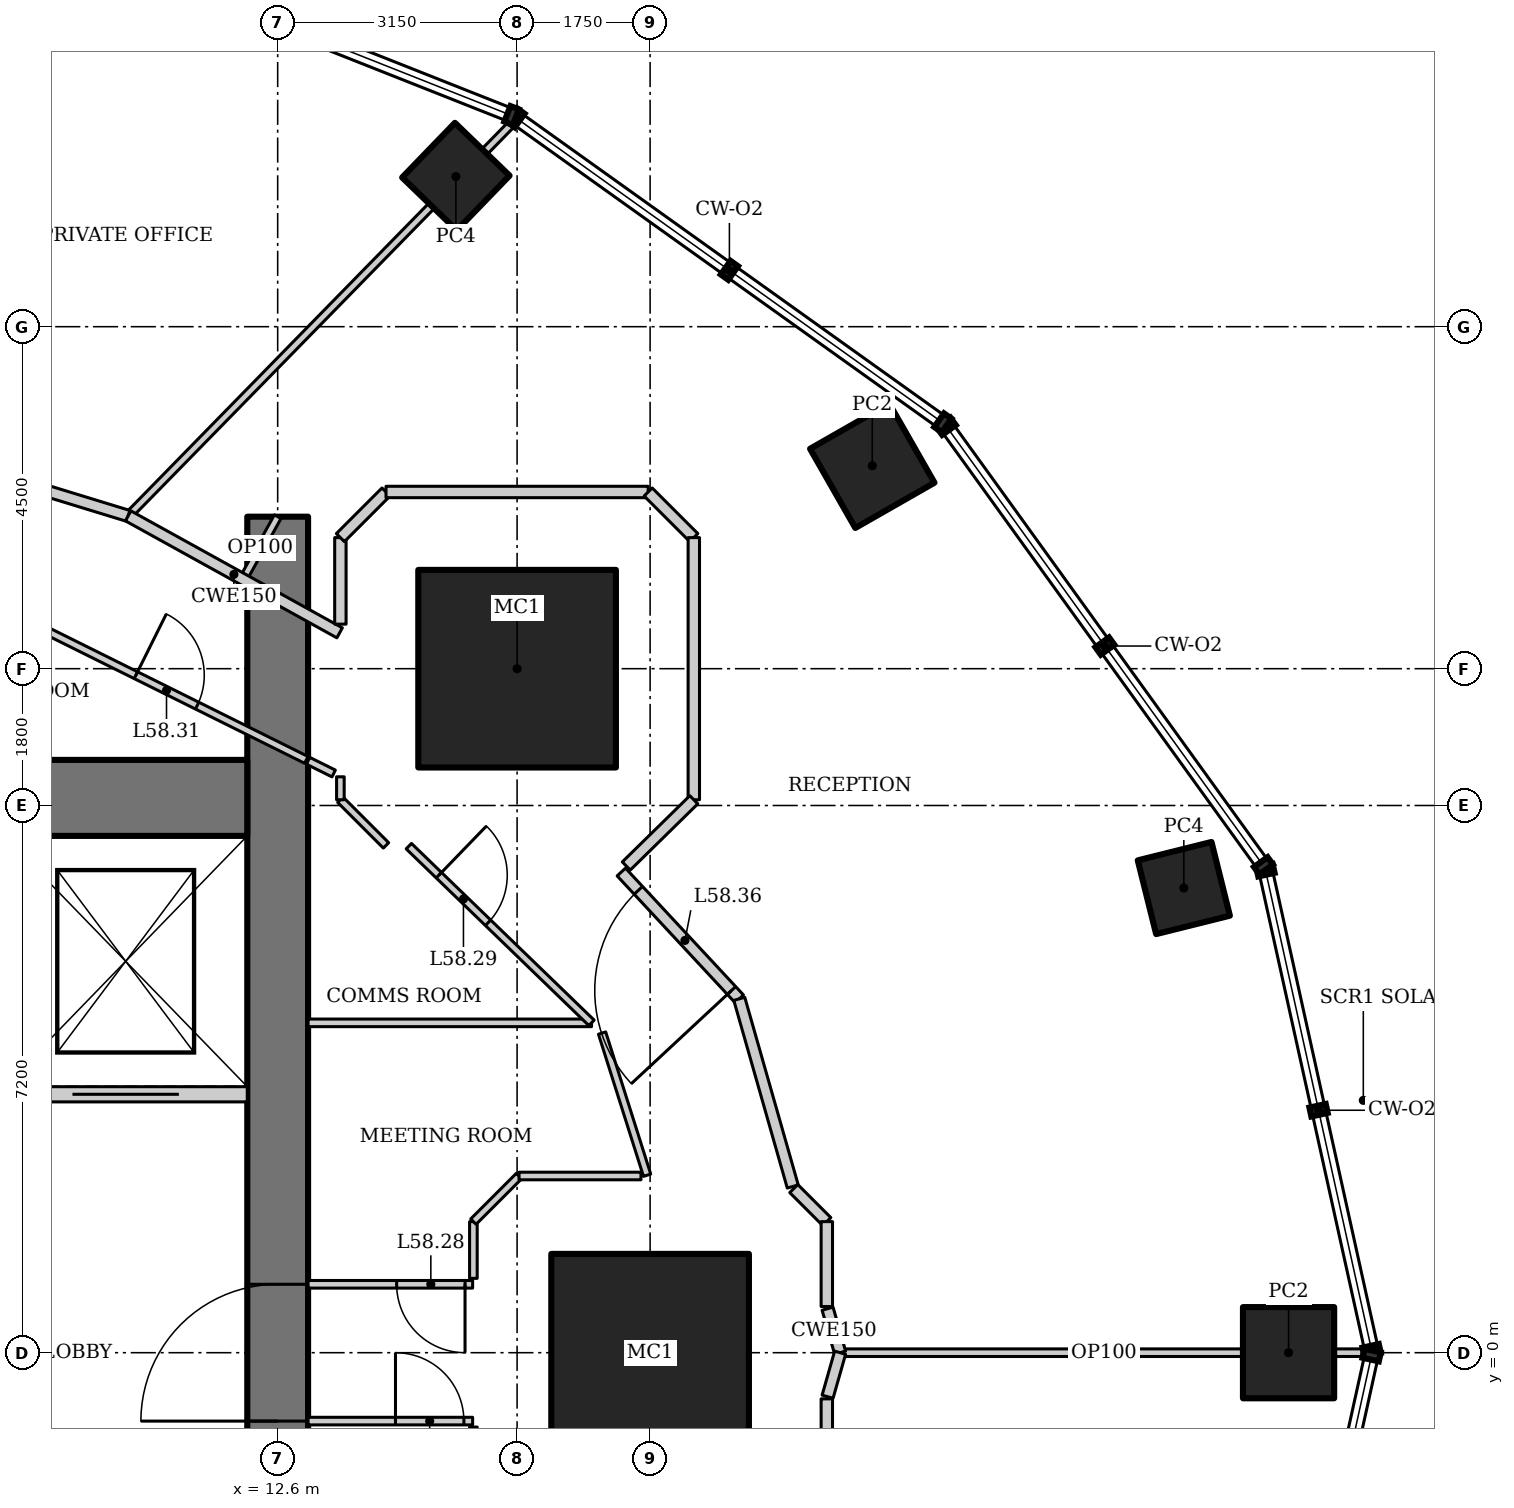
"""IFC4 building model, lengths in metres.
Left out: names, types, materials, properties, quantities, classifications, styles, units other than length and angle.
Written with IfcOpenShell. Run it as: python <this file> out.ifc"""

import sys

from ifc_helpers import new_model, si_unit, direction, frame, frame_2d, origin, origin_2d, place, context, subcontext, project, spatial, rectangle, hollow_rectangle, extrude, element, fill, save


model = new_model("IFC4")
c1 = context("Model", 3, precision=1e-05, world=origin(), true_north=direction((0.0, 1.0)))
c2 = subcontext(c1, "Body", "Model", "MODEL_VIEW")
j1 = project(units=[si_unit("LENGTHUNIT", "METRE"), si_unit("PLANEANGLEUNIT", "RADIAN")], contexts=[c1])
p1 = place(None, origin())
s1 = spatial("IfcSite", under=j1, at=p1, CompositionType="ELEMENT")
p2 = place(p1, origin())
s2 = spatial("IfcBuilding", under=s1, at=p2, CompositionType="ELEMENT")
p3 = place(p2, frame((0.0, 0.0, 249.4)))
s3 = spatial("IfcBuildingStorey", under=s2, at=p3, CompositionType="ELEMENT", Elevation=249.4)
for number, where, z_axis, x_axis in (
    (1, (17.5, 0.0, 0.0), (0.0, 0.0, 1.0), (1.0, 0.0, 0.0)),
    (2, (15.75, 9.0, 0.0), (0.0, 0.0, 1.0), (1.0, 0.0, 0.0)),
):
    element("IfcColumn", number, at=place(p3, frame(where, z_axis=z_axis, x_axis=x_axis)), inside=s3, PredefinedType="COLUMN", context=c2, shape_type="SweptSolid", body=[
        extrude(hollow_rectangle(XDim=2.6, YDim=2.6, WallThickness=0.13, at=origin_2d()), origin(), (0.0, 0.0, 1.0), 4.2),
    ])
p4 = place(p3, frame((25.9, 0.0, 0.0), z_axis=(0.0, 0.0, 1.0), x_axis=(1.0, 0.0, 0.0)))
e3 = element("IfcColumn", 3, at=p4, inside=s3, PredefinedType="COLUMN", context=c2, shape_type="SweptSolid", body=[
    extrude(hollow_rectangle(XDim=1.2, YDim=1.2, WallThickness=0.1, at=origin_2d()), origin(), (0.0, 0.0, 1.0), 4.2),
])
p5 = place(p3, frame((24.522, 6.114, 0.0), z_axis=(0.0, 0.0, 1.0), x_axis=(0.970295726276, 0.2419218956, 0.0)))
e4 = element("IfcColumn", 4, at=p5, inside=s3, PredefinedType="COLUMN", context=c2, shape_type="SweptSolid", body=[
    extrude(hollow_rectangle(XDim=1.0, YDim=1.0, WallThickness=0.08, at=origin_2d()), origin(), (0.0, 0.0, 1.0), 4.2),
])
p6 = place(p3, frame((20.423, 11.67, 0.0), z_axis=(0.0, 0.0, 1.0), x_axis=(0.86824298017, 0.496139221777, 0.0)))
e5 = element("IfcColumn", 5, at=p6, inside=s3, PredefinedType="COLUMN", context=c2, shape_type="SweptSolid", body=[
    extrude(hollow_rectangle(XDim=1.2, YDim=1.2, WallThickness=0.1, at=origin_2d()), origin(), (0.0, 0.0, 1.0), 4.2),
])
for number, where, z_axis, x_axis in (
    (6, (14.944, 15.475, 0.0), (0.0, 0.0, 1.0), (0.695, 0.719, 0.0)),
    (7, (9.035, 17.731, 0.0), (0.0, 0.0, 1.0), (0.454, 0.891, 0.0)),
):
    element("IfcColumn", number, at=place(p3, frame(where, z_axis=z_axis, x_axis=x_axis)), inside=s3, PredefinedType="COLUMN", context=c2, shape_type="SweptSolid", body=[
        extrude(hollow_rectangle(XDim=1.0, YDim=1.0, WallThickness=0.08, at=origin_2d()), origin(), (0.0, 0.0, 1.0), 4.2),
    ])
p7 = place(p3, frame((12.6, -11.0, 0.0), z_axis=(0.0, 0.0, 1.0), x_axis=(0.0, 1.0, 0.0)))
e8 = element("IfcWall", 8, at=p7, inside=s3, PredefinedType="SHEAR", context=c2, shape_type="SweptSolid", body=[
    extrude(rectangle(XDim=22.0, YDim=0.8, at=frame_2d((11.0, 0.0))), origin(), (0.0, 0.0, 1.0), 4.2),
])
p8 = place(p7, frame((10.1, 0.0, 0.0)))
e9 = element("IfcOpeningElement", 9, at=p8, cuts=e8, PredefinedType="OPENING", context=c2, shape_type="SweptSolid", body=[
    extrude(rectangle(XDim=1.8, YDim=2.1, at=frame_2d((0.9, 1.05))), frame((0.0, 0.41, 0.0), z_axis=(0.0, -1.0, 0.0), x_axis=(1.0, 0.0, 0.0)), (0.0, 0.0, 1.0), 0.82),
])
p9 = place(p3, frame((12.2, 7.3, 0.0), z_axis=(0.0, 0.0, 1.0), x_axis=(-1.0, 0.0, 0.0)))
e10 = element("IfcWall", 10, at=p9, inside=s3, PredefinedType="SHEAR", context=c2, shape_type="SweptSolid", body=[
    extrude(rectangle(XDim=6.6, YDim=1.0, at=frame_2d((3.3, 0.0))), origin(), (0.0, 0.0, 1.0), 4.2),
])
p10 = place(p3, frame((12.2, 3.4, 0.0), z_axis=(0.0, 0.0, 1.0), x_axis=(-1.0, 0.0, 0.0)))
e11 = element("IfcWall", 11, at=p10, inside=s3, PredefinedType="SOLIDWALL", context=c2, shape_type="SweptSolid", body=[
    extrude(rectangle(XDim=6.6, YDim=0.2, at=frame_2d((3.3, 0.0))), origin(), (0.0, 0.0, 1.0), 4.2),
])
p11 = place(p10, frame((4.45, 0.0, 0.0)))
e12 = element("IfcOpeningElement", 12, at=p11, cuts=e11, PredefinedType="OPENING", context=c2, shape_type="SweptSolid", body=[
    extrude(rectangle(XDim=1.1, YDim=2.2, at=frame_2d((0.55, 1.1))), frame((0.0, 0.11, 0.0), z_axis=(0.0, -1.0, 0.0), x_axis=(1.0, 0.0, 0.0)), (0.0, 0.0, 1.0), 0.22),
])
p12 = place(p10, frame((0.9, 0.0, 0.0)))
e13 = element("IfcOpeningElement", 13, at=p12, cuts=e11, PredefinedType="OPENING", context=c2, shape_type="SweptSolid", body=[
    extrude(rectangle(XDim=1.4, YDim=2.2, at=frame_2d((0.7, 1.1))), frame((0.0, 0.11, 0.0), z_axis=(0.0, -1.0, 0.0), x_axis=(1.0, 0.0, 0.0)), (0.0, 0.0, 1.0), 0.22),
])
p13 = place(p3, frame((26.944, 0.0, 0.0), z_axis=(0.0, 0.0, 1.0), x_axis=(-1.0, 0.0, 0.0)))
e14 = element("IfcWall", 14, at=p13, inside=s3, PredefinedType="PARTITIONING", context=c2, shape_type="SweptSolid", body=[
    extrude(rectangle(XDim=6.944, YDim=0.1, at=frame_2d((3.472, 0.0))), origin(), (0.0, 0.0, 1.0), 3.349),
])
p14 = place(p3, frame((15.709, 16.199, 0.0), z_axis=(0.0, 0.0, 1.0), x_axis=(-0.699362525935, -0.714767135029, 0.0)))
e15 = element("IfcWall", 15, at=p14, inside=s3, PredefinedType="PARTITIONING", context=c2, shape_type="SweptSolid", body=[
    extrude(rectangle(XDim=7.259, YDim=0.1, at=frame_2d((3.629, 0.0))), origin(), (0.0, 0.0, 1.0), 3.41),
])
p15 = place(p3, frame((10.633, 11.01, 0.0), z_axis=(0.0, 0.0, 1.0), x_axis=(-0.956185837153, 0.292760388079, 0.0)))
e16 = element("IfcWall", 16, at=p15, inside=s3, PredefinedType="PARTITIONING", context=c2, shape_type="SweptSolid", body=[
    extrude(rectangle(XDim=4.544, YDim=0.15, at=frame_2d((2.272, 0.0))), origin(), (0.0, 0.0, 1.0), 4.05),
])
p16 = place(p15, frame((3.494, 0.0, 0.0)))
e17 = element("IfcOpeningElement", 17, at=p16, cuts=e16, PredefinedType="OPENING", context=c2, shape_type="SweptSolid", body=[
    extrude(rectangle(XDim=0.9, YDim=2.1, at=frame_2d((0.45, 1.05))), frame((0.0, 0.085, 0.0), z_axis=(0.0, -1.0, 0.0), x_axis=(1.0, 0.0, 0.0)), (0.0, 0.0, 1.0), 0.17),
])
p17 = place(p3, frame((13.0, 4.34, 0.0), z_axis=(0.0, 0.0, 1.0), x_axis=(1.0, 0.0, 0.0)))
e18 = element("IfcWall", 18, at=p17, inside=s3, PredefinedType="PARTITIONING", context=c2, shape_type="SweptSolid", body=[
    extrude(rectangle(XDim=3.729, YDim=0.1, at=frame_2d((1.865, 0.0))), origin(), (0.0, 0.0, 1.0), 4.05),
])
p18 = place(p3, frame((13.0, 7.788, 0.0), z_axis=(0.0, 0.0, 1.0), x_axis=(0.895721570004, -0.444615416995, 0.0)))
e19 = element("IfcWall", 19, at=p18, inside=s3, PredefinedType="PARTITIONING", context=c2, shape_type="SweptSolid", body=[
    extrude(rectangle(XDim=0.376, YDim=0.1, at=frame_2d((0.188, 0.0))), origin(), (0.0, 0.0, 1.0), 4.05),
])
p19 = place(p3, frame((9.298, 9.628, 0.0), z_axis=(0.0, 0.0, 1.0), x_axis=(0.895529831139, -0.445001484874, 0.0)))
e20 = element("IfcWall", 20, at=p19, inside=s3, PredefinedType="PARTITIONING", context=c2, shape_type="SweptSolid", body=[
    extrude(rectangle(XDim=4.108, YDim=0.1, at=frame_2d((2.054, 0.0))), origin(), (0.0, 0.0, 1.0), 4.05),
])
p20 = place(p19, frame((1.604, 0.0, 0.0)))
e21 = element("IfcOpeningElement", 21, at=p20, cuts=e20, PredefinedType="OPENING", context=c2, shape_type="SweptSolid", body=[
    extrude(rectangle(XDim=0.9, YDim=2.1, at=frame_2d((0.45, 1.05))), frame((0.0, 0.06, 0.0), z_axis=(0.0, -1.0, 0.0), x_axis=(1.0, 0.0, 0.0)), (0.0, 0.0, 1.0), 0.12),
])
p21 = place(p3, frame((12.6, 11.0, 0.0), z_axis=(0.0, 0.0, 1.0), x_axis=(-0.484103558985, -0.875010710893, 0.0)))
e22 = element("IfcWall", 22, at=p21, inside=s3, PredefinedType="PARTITIONING", context=c2, shape_type="SweptSolid", body=[
    extrude(rectangle(XDim=0.943, YDim=0.1, at=frame_2d((0.472, 0.0))), origin(), (0.0, 0.0, 1.0), 4.05),
])
p22 = place(p3, frame((18.673, 4.656, 0.0), z_axis=(0.0, 0.0, 1.0), x_axis=(-0.680985069419, 0.732297299755, 0.0)))
e23 = element("IfcWall", 23, at=p22, inside=s3, PredefinedType="PARTITIONING", context=c2, shape_type="SweptSolid", body=[
    extrude(rectangle(XDim=2.279, YDim=0.15, at=frame_2d((1.14, 0.0))), origin(), (0.0, 0.0, 1.0), 4.05),
])
p23 = place(p22, frame((0.15, 0.0, 0.0)))
e24 = element("IfcOpeningElement", 24, at=p23, cuts=e23, PredefinedType="OPENING", context=c2, shape_type="SweptSolid", body=[
    extrude(rectangle(XDim=1.8, YDim=2.1, at=frame_2d((0.9, 1.05))), frame((0.0, 0.085, 0.0), z_axis=(0.0, -1.0, 0.0), x_axis=(1.0, 0.0, 0.0)), (0.0, 0.0, 1.0), 0.17),
])
p24 = place(p3, frame((13.415, 9.472, 0.0), z_axis=(0.0, 0.0, 1.0), x_axis=(-0.875072100837, 0.483992580869, 0.0)))
e25 = element("IfcWall", 25, at=p24, inside=s3, PredefinedType="PARTITIONING", context=c2, shape_type="SweptSolid", body=[
    extrude(rectangle(XDim=3.179, YDim=0.15, at=frame_2d((1.59, 0.0))), origin(), (0.0, 0.0, 1.0), 4.05),
])
p25 = place(p3, frame((14.325, 6.665, 0.0), z_axis=(0.0, 0.0, 1.0), x_axis=(0.718798647558, -0.695218314107, 0.0)))
e26 = element("IfcWall", 26, at=p25, inside=s3, PredefinedType="PARTITIONING", context=c2, shape_type="SweptSolid", body=[
    extrude(rectangle(XDim=3.344, YDim=0.1, at=frame_2d((1.672, 0.0))), origin(), (0.0, 0.0, 1.0), 4.05),
])
p26 = place(p25, frame((0.55, 0.0, 0.0)))
e27 = element("IfcOpeningElement", 27, at=p26, cuts=e26, PredefinedType="OPENING", context=c2, shape_type="SweptSolid", body=[
    extrude(rectangle(XDim=0.9, YDim=2.1, at=frame_2d((0.45, 1.05))), frame((0.0, 0.06, 0.0), z_axis=(0.0, -1.0, 0.0), x_axis=(1.0, 0.0, 0.0)), (0.0, 0.0, 1.0), 0.12),
])
p27 = place(p3, frame((14.025, 6.675, 0.0), z_axis=(0.0, 0.0, 1.0), x_axis=(-0.707106781187, 0.707106781187, 0.0)))
e28 = element("IfcWall", 28, at=p27, inside=s3, PredefinedType="PARTITIONING", context=c2, shape_type="SweptSolid", body=[
    extrude(rectangle(XDim=0.849, YDim=0.1, at=frame_2d((0.425, 0.0))), origin(), (0.0, 0.0, 1.0), 4.05),
])
p28 = place(p3, frame((13.425, 7.275, 0.0), z_axis=(0.0, 0.0, 1.0), x_axis=(0.0, 1.0, 0.0)))
e29 = element("IfcWall", 29, at=p28, inside=s3, PredefinedType="PARTITIONING", context=c2, shape_type="SweptSolid", body=[
    extrude(rectangle(XDim=0.302, YDim=0.1, at=frame_2d((0.151, 0.0))), origin(), (0.0, 0.0, 1.0), 4.05),
])
p29 = place(p3, frame((13.425, 9.586, 0.0), z_axis=(0.0, 0.0, 1.0), x_axis=(0.0, 1.0, 0.0)))
e30 = element("IfcWall", 30, at=p29, inside=s3, PredefinedType="PARTITIONING", context=c2, shape_type="SweptSolid", body=[
    extrude(rectangle(XDim=1.138, YDim=0.15, at=frame_2d((0.569, 0.0))), origin(), (0.0, 0.0, 1.0), 4.05),
])
p30 = place(p3, frame((13.425, 10.725, 0.0), z_axis=(0.0, 0.0, 1.0), x_axis=(0.707106781187, 0.707106781187, 0.0)))
e31 = element("IfcWall", 31, at=p30, inside=s3, PredefinedType="PARTITIONING", context=c2, shape_type="SweptSolid", body=[
    extrude(rectangle(XDim=0.849, YDim=0.15, at=frame_2d((0.425, 0.0))), origin(), (0.0, 0.0, 1.0), 4.05),
])
p31 = place(p3, frame((14.025, 11.325, 0.0), z_axis=(0.0, 0.0, 1.0), x_axis=(1.0, 0.0, 0.0)))
e32 = element("IfcWall", 32, at=p31, inside=s3, PredefinedType="PARTITIONING", context=c2, shape_type="SweptSolid", body=[
    extrude(rectangle(XDim=3.449, YDim=0.15, at=frame_2d((1.725, 0.0))), origin(), (0.0, 0.0, 1.0), 4.05),
])
p32 = place(p3, frame((17.475, 11.325, 0.0), z_axis=(0.0, 0.0, 1.0), x_axis=(0.707106781187, -0.707106781187, 0.0)))
e33 = element("IfcWall", 33, at=p32, inside=s3, PredefinedType="PARTITIONING", context=c2, shape_type="SweptSolid", body=[
    extrude(rectangle(XDim=0.849, YDim=0.15, at=frame_2d((0.425, 0.0))), origin(), (0.0, 0.0, 1.0), 4.05),
])
p33 = place(p3, frame((18.075, 10.725, 0.0), z_axis=(0.0, 0.0, 1.0), x_axis=(0.0, -1.0, 0.0)))
e34 = element("IfcWall", 34, at=p33, inside=s3, PredefinedType="PARTITIONING", context=c2, shape_type="SweptSolid", body=[
    extrude(rectangle(XDim=3.449, YDim=0.15, at=frame_2d((1.725, 0.0))), origin(), (0.0, 0.0, 1.0), 3.601),
])
p34 = place(p3, frame((18.075, 7.275, 0.0), z_axis=(0.0, 0.0, 1.0), x_axis=(-0.713842064016, -0.700306723973, 0.0)))
e35 = element("IfcWall", 35, at=p34, inside=s3, PredefinedType="PARTITIONING", context=c2, shape_type="SweptSolid", body=[
    extrude(rectangle(XDim=1.245, YDim=0.15, at=frame_2d((0.622, 0.0))), origin(), (0.0, 0.0, 1.0), 4.05),
])
p35 = place(p3, frame((20.0, 0.0, 0.0), z_axis=(0.0, 0.0, 1.0), x_axis=(-0.27407847996, 0.961707329089, 0.0)))
e36 = element("IfcWall", 36, at=p35, inside=s3, PredefinedType="PARTITIONING", context=c2, shape_type="SweptSolid", body=[
    extrude(rectangle(XDim=0.602, YDim=0.15, at=frame_2d((0.301, 0.0))), origin(), (0.0, 0.0, 1.0), 4.05),
])
p36 = place(p3, frame((19.377, 2.187, 0.0), z_axis=(0.0, 0.0, 1.0), x_axis=(-0.274067949327, 0.961710330168, 0.0)))
e37 = element("IfcWall", 37, at=p36, inside=s3, PredefinedType="PARTITIONING", context=c2, shape_type="SweptSolid", body=[
    extrude(rectangle(XDim=2.567, YDim=0.15, at=frame_2d((1.284, 0.0))), origin(), (0.0, 0.0, 1.0), 4.05),
])
p37 = place(p3, frame((19.835, -0.579, 0.0), z_axis=(0.0, 0.0, 1.0), x_axis=(0.27407847996, 0.961707329089, 0.0)))
e38 = element("IfcWall", 38, at=p37, inside=s3, PredefinedType="PARTITIONING", context=c2, shape_type="SweptSolid", body=[
    extrude(rectangle(XDim=0.602, YDim=0.15, at=frame_2d((0.301, 0.0))), origin(), (0.0, 0.0, 1.0), 4.05),
])
p38 = place(p3, frame((13.0, -0.9, 0.0), z_axis=(0.0, 0.0, 1.0), x_axis=(1.0, 0.0, 0.0)))
e39 = element("IfcWall", 39, at=p38, inside=s3, PredefinedType="PARTITIONING", context=c2, shape_type="SweptSolid", body=[
    extrude(rectangle(XDim=2.165, YDim=0.1, at=frame_2d((1.083, 0.0))), origin(), (0.0, 0.0, 1.0), 4.05),
])
p39 = place(p38, frame((1.15, 0.0, 0.0)))
e40 = element("IfcOpeningElement", 40, at=p39, cuts=e39, PredefinedType="OPENING", context=c2, shape_type="SweptSolid", body=[
    extrude(rectangle(XDim=0.9, YDim=2.1, at=frame_2d((0.45, 1.05))), frame((0.0, 0.06, 0.0), z_axis=(0.0, -1.0, 0.0), x_axis=(1.0, 0.0, 0.0)), (0.0, 0.0, 1.0), 0.12),
])
p40 = place(p3, frame((16.868, 4.206, 0.0), z_axis=(0.0, 0.0, 1.0), x_axis=(0.301821975729, -0.953364303384, 0.0)))
e41 = element("IfcWall", 41, at=p40, inside=s3, PredefinedType="PARTITIONING", context=c2, shape_type="SweptSolid", body=[
    extrude(rectangle(XDim=1.962, YDim=0.1, at=frame_2d((0.981, 0.0))), origin(), (0.0, 0.0, 1.0), 4.05),
])
p41 = place(p3, frame((15.165, 0.9, 0.0), z_axis=(0.0, 0.0, 1.0), x_axis=(-1.0, 0.0, 0.0)))
e42 = element("IfcWall", 42, at=p41, inside=s3, PredefinedType="PARTITIONING", context=c2, shape_type="SweptSolid", body=[
    extrude(rectangle(XDim=2.165, YDim=0.1, at=frame_2d((1.083, 0.0))), origin(), (0.0, 0.0, 1.0), 4.05),
])
p42 = place(p41, frame((0.1, 0.0, 0.0)))
e43 = element("IfcOpeningElement", 43, at=p42, cuts=e42, PredefinedType="OPENING", context=c2, shape_type="SweptSolid", body=[
    extrude(rectangle(XDim=0.9, YDim=2.1, at=frame_2d((0.45, 1.05))), frame((0.0, 0.06, 0.0), z_axis=(0.0, -1.0, 0.0), x_axis=(1.0, 0.0, 0.0)), (0.0, 0.0, 1.0), 0.12),
])
for number, where, z_axis, x_axis in (
    (44, (15.175, -1.725, 0.0), (0.0, 0.0, 1.0), (0.0, 1.0, 0.0)),
    (45, (15.175, 0.978, 0.0), (0.0, 0.0, 1.0), (0.0, 1.0, 0.0)),
):
    element("IfcWall", number, at=place(p3, frame(where, z_axis=z_axis, x_axis=x_axis)), inside=s3, PredefinedType="PARTITIONING", context=c2, shape_type="SweptSolid", body=[
        extrude(rectangle(XDim=0.746, YDim=0.1, at=frame_2d((0.373, 0.0))), origin(), (0.0, 0.0, 1.0), 4.05),
    ])
p43 = place(p3, frame((15.175, 1.725, 0.0), z_axis=(0.0, 0.0, 1.0), x_axis=(0.707106781187, 0.707106781187, 0.0)))
e46 = element("IfcWall", 46, at=p43, inside=s3, PredefinedType="PARTITIONING", context=c2, shape_type="SweptSolid", body=[
    extrude(rectangle(XDim=0.849, YDim=0.1, at=frame_2d((0.425, 0.0))), origin(), (0.0, 0.0, 1.0), 4.05),
])
p44 = place(p3, frame((15.775, 2.325, 0.0), z_axis=(0.0, 0.0, 1.0), x_axis=(1.0, 0.0, 0.0)))
e47 = element("IfcWall", 47, at=p44, inside=s3, PredefinedType="PARTITIONING", context=c2, shape_type="SweptSolid", body=[
    extrude(rectangle(XDim=1.604, YDim=0.1, at=frame_2d((0.802, 0.0))), origin(), (0.0, 0.0, 1.0), 4.05),
])
p45 = place(p3, frame((19.39, 2.159, 0.0), z_axis=(0.0, 0.0, 1.0), x_axis=(0.707106781187, -0.707106781187, 0.0)))
e48 = element("IfcWall", 48, at=p45, inside=s3, PredefinedType="PARTITIONING", context=c2, shape_type="SweptSolid", body=[
    extrude(rectangle(XDim=0.615, YDim=0.15, at=frame_2d((0.308, 0.0))), origin(), (0.0, 0.0, 1.0), 4.05),
])
for number, where, z_axis, x_axis in (
    (49, (19.825, 1.725, 0.0), (0.0, 0.0, 1.0), (0.0, -1.0, 0.0)),
    (50, (19.825, -0.607, 0.0), (0.0, 0.0, 1.0), (0.0, -1.0, 0.0)),
):
    element("IfcWall", number, at=place(p3, frame(where, z_axis=z_axis, x_axis=x_axis)), inside=s3, PredefinedType="PARTITIONING", context=c2, shape_type="SweptSolid", body=[
        extrude(rectangle(XDim=1.117, YDim=0.15, at=frame_2d((0.559, 0.0))), origin(), (0.0, 0.0, 1.0), 4.05),
    ])
p46 = place(p8, origin())
e51 = element("IfcDoor", 51, at=p46, inside=s3, OperationType="DOUBLE_DOOR_DOUBLE_SWING", PredefinedType="DOOR", context=c2, shape_type="SweptSolid", body=[
    extrude(rectangle(XDim=1.8, YDim=2.1, at=frame_2d((0.9, 1.05))), frame((0.0, 0.025, 0.0), z_axis=(0.0, -1.0, 0.0), x_axis=(1.0, 0.0, 0.0)), (0.0, 0.0, 1.0), 0.05),
])
fill(e9, e51)
p47 = place(p12, origin())
e52 = element("IfcDoor", 52, at=p47, inside=s3, OperationType="DOUBLE_DOOR_SLIDING", PredefinedType="DOOR", context=c2, shape_type="SweptSolid", body=[
    extrude(rectangle(XDim=1.4, YDim=2.2, at=frame_2d((0.7, 1.1))), frame((0.0, 0.025, 0.0), z_axis=(0.0, -1.0, 0.0), x_axis=(1.0, 0.0, 0.0)), (0.0, 0.0, 1.0), 0.05),
])
fill(e13, e52)
p48 = place(p39, origin())
e53 = element("IfcDoor", 53, at=p48, inside=s3, OperationType="SINGLE_SWING_LEFT", PredefinedType="DOOR", context=c2, shape_type="SweptSolid", body=[
    extrude(rectangle(XDim=0.9, YDim=2.1, at=frame_2d((0.45, 1.05))), frame((0.0, 0.025, 0.0), z_axis=(0.0, -1.0, 0.0), x_axis=(1.0, 0.0, 0.0)), (0.0, 0.0, 1.0), 0.05),
])
fill(e40, e53)
p49 = place(p42, origin())
e54 = element("IfcDoor", 54, at=p49, inside=s3, OperationType="SINGLE_SWING_LEFT", PredefinedType="DOOR", context=c2, shape_type="SweptSolid", body=[
    extrude(rectangle(XDim=0.9, YDim=2.1, at=frame_2d((0.45, 1.05))), frame((0.0, 0.025, 0.0), z_axis=(0.0, -1.0, 0.0), x_axis=(1.0, 0.0, 0.0)), (0.0, 0.0, 1.0), 0.05),
])
fill(e43, e54)
p50 = place(p26, origin())
e55 = element("IfcDoor", 55, at=p50, inside=s3, OperationType="SINGLE_SWING_LEFT", PredefinedType="DOOR", context=c2, shape_type="SweptSolid", body=[
    extrude(rectangle(XDim=0.9, YDim=2.1, at=frame_2d((0.45, 1.05))), frame((0.0, 0.025, 0.0), z_axis=(0.0, -1.0, 0.0), x_axis=(1.0, 0.0, 0.0)), (0.0, 0.0, 1.0), 0.05),
])
fill(e27, e55)
p51 = place(p20, origin())
e56 = element("IfcDoor", 56, at=p51, inside=s3, OperationType="SINGLE_SWING_LEFT", PredefinedType="DOOR", context=c2, shape_type="SweptSolid", body=[
    extrude(rectangle(XDim=0.9, YDim=2.1, at=frame_2d((0.45, 1.05))), frame((0.0, 0.025, 0.0), z_axis=(0.0, -1.0, 0.0), x_axis=(1.0, 0.0, 0.0)), (0.0, 0.0, 1.0), 0.05),
])
fill(e21, e56)
p52 = place(p23, origin())
e57 = element("IfcDoor", 57, at=p52, inside=s3, OperationType="DOUBLE_DOOR_DOUBLE_SWING", PredefinedType="DOOR", context=c2, shape_type="SweptSolid", body=[
    extrude(rectangle(XDim=1.8, YDim=2.1, at=frame_2d((0.9, 1.05))), frame((0.0, 0.025, 0.0), z_axis=(0.0, -1.0, 0.0), x_axis=(1.0, 0.0, 0.0)), (0.0, 0.0, 1.0), 0.05),
])
fill(e24, e57)
save(model, sys.argv[1])
